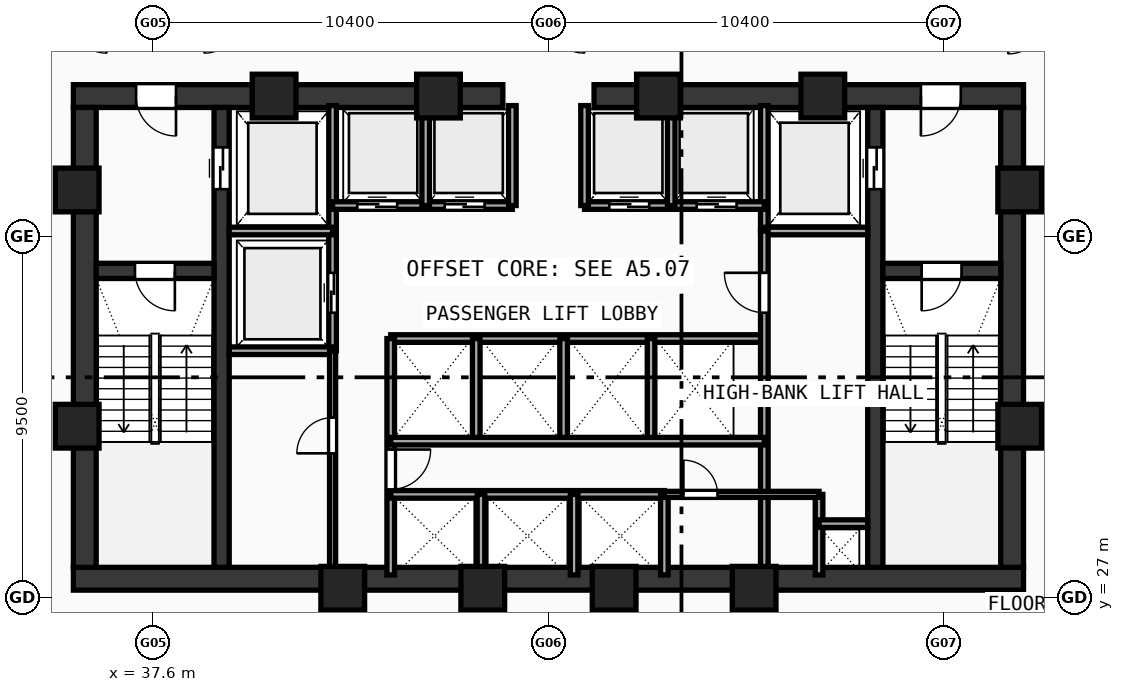
"""IFC4 building model, lengths in metres.
Left out: names, types, materials, properties, quantities, classifications, styles, units other than length and angle.
Written with IfcOpenShell. Run it as: python <this file> out.ifc"""

import sys

from ifc_helpers import new_model, si_unit, direction, frame, frame_2d, origin, origin_with_axes, origin_2d, place, context, subcontext, project, spatial, rectangle, hollow_rectangle, extrude, source, transform, mapped, element, fill, save


model = new_model("IFC4")
c1 = context("Model", 3, precision=1e-05, world=origin(), true_north=direction((0.0, 1.0)))
c2 = subcontext(c1, "Body", "Model", "MODEL_VIEW")
j1 = project(units=[si_unit("LENGTHUNIT", "METRE"), si_unit("PLANEANGLEUNIT", "RADIAN")], contexts=[c1])
p1 = place(None, origin())
s1 = spatial("IfcSite", under=j1, at=p1, CompositionType="ELEMENT")
p2 = place(p1, origin())
s2 = spatial("IfcBuilding", under=s1, at=p2, CompositionType="ELEMENT")
p3 = place(p2, frame((0.0, 0.0, 84.98)))
s3 = spatial("IfcBuildingStorey", under=s2, at=p3, CompositionType="ELEMENT", Elevation=84.98)
p4 = place(p3, frame((35.5, 27.5, 0.0), z_axis=(0.0, 0.0, 1.0), x_axis=(1.0, 0.0, 0.0)))
e1 = element("IfcWall", 1, at=p4, inside=s3, PredefinedType="SHEAR", context=c2, shape_type="SweptSolid", body=[
    extrude(rectangle(XDim=25.0, YDim=0.6, at=frame_2d((12.5, 0.0))), origin(), (0.0, 0.0, 1.0), 3.54),
])
p5 = place(p3, frame((35.5, 40.2, 0.0), z_axis=(0.0, 0.0, 1.0), x_axis=(1.0, 0.0, 0.0)))
e2 = element("IfcWall", 2, at=p5, inside=s3, PredefinedType="SHEAR", context=c2, shape_type="SweptSolid", body=[
    extrude(rectangle(XDim=11.3, YDim=0.6, at=frame_2d((5.65, 0.0))), origin(), (0.0, 0.0, 1.0), 3.54),
])
p6 = place(p5, frame((1.65, 0.0, 0.0)))
e3 = element("IfcOpeningElement", 3, at=p6, cuts=e2, PredefinedType="OPENING", context=c2, shape_type="SweptSolid", body=[
    extrude(rectangle(XDim=1.05, YDim=2.1, at=frame_2d((0.525, 1.05))), frame((0.0, 0.31, 0.0), z_axis=(0.0, -1.0, 0.0), x_axis=(1.0, 0.0, 0.0)), (0.0, 0.0, 1.0), 0.62),
])
p7 = place(p3, frame((49.2, 40.2, 0.0), z_axis=(0.0, 0.0, 1.0), x_axis=(1.0, 0.0, 0.0)))
e4 = element("IfcWall", 4, at=p7, inside=s3, PredefinedType="SHEAR", context=c2, shape_type="SweptSolid", body=[
    extrude(rectangle(XDim=11.3, YDim=0.6, at=frame_2d((5.65, 0.0))), origin(), (0.0, 0.0, 1.0), 3.54),
])
p8 = place(p7, frame((8.6, 0.0, 0.0)))
e5 = element("IfcOpeningElement", 5, at=p8, cuts=e4, PredefinedType="OPENING", context=c2, shape_type="SweptSolid", body=[
    extrude(rectangle(XDim=1.05, YDim=2.1, at=frame_2d((0.525, 1.05))), frame((0.0, 0.31, 0.0), z_axis=(0.0, -1.0, 0.0), x_axis=(1.0, 0.0, 0.0)), (0.0, 0.0, 1.0), 0.62),
])
for number, where, z_axis, x_axis in (
    (6, (35.8, 27.8, 0.0), (0.0, 0.0, 1.0), (0.0, 1.0, 0.0)),
    (7, (60.2, 27.8, 0.0), (0.0, 0.0, 1.0), (0.0, 1.0, 0.0)),
):
    element("IfcWall", number, at=place(p3, frame(where, z_axis=z_axis, x_axis=x_axis)), inside=s3, PredefinedType="SHEAR", context=c2, shape_type="SweptSolid", body=[
        extrude(rectangle(XDim=12.1, YDim=0.6, at=frame_2d((6.05, 0.0))), origin(), (0.0, 0.0, 1.0), 3.54),
    ])
p9 = place(p3, frame((39.4, 27.8, 0.0), z_axis=(0.0, 0.0, 1.0), x_axis=(0.0, 1.0, 0.0)))
e8 = element("IfcWall", 8, at=p9, inside=s3, PredefinedType="SHEAR", context=c2, shape_type="SweptSolid", body=[
    extrude(rectangle(XDim=12.1, YDim=0.4, at=frame_2d((6.05, 0.0))), origin(), (0.0, 0.0, 1.0), 3.54),
])
p10 = place(p9, frame((9.95, 0.0, 0.0)))
e9 = element("IfcOpeningElement", 9, at=p10, cuts=e8, PredefinedType="OPENING", context=c2, shape_type="SweptSolid", body=[
    extrude(rectangle(XDim=1.1, YDim=2.1, at=frame_2d((0.55, 1.05))), frame((0.0, 0.21, 0.0), z_axis=(0.0, -1.0, 0.0), x_axis=(1.0, 0.0, 0.0)), (0.0, 0.0, 1.0), 0.42),
])
p11 = place(p3, frame((56.6, 27.8, 0.0), z_axis=(0.0, 0.0, 1.0), x_axis=(0.0, 1.0, 0.0)))
e10 = element("IfcWall", 10, at=p11, inside=s3, PredefinedType="SHEAR", context=c2, shape_type="SweptSolid", body=[
    extrude(rectangle(XDim=12.1, YDim=0.4, at=frame_2d((6.05, 0.0))), origin(), (0.0, 0.0, 1.0), 3.54),
])
p12 = place(p11, frame((9.95, 0.0, 0.0)))
e11 = element("IfcOpeningElement", 11, at=p12, cuts=e10, PredefinedType="OPENING", context=c2, shape_type="SweptSolid", body=[
    extrude(rectangle(XDim=1.1, YDim=2.1, at=frame_2d((0.55, 1.05))), frame((0.0, 0.21, 0.0), z_axis=(0.0, -1.0, 0.0), x_axis=(1.0, 0.0, 0.0)), (0.0, 0.0, 1.0), 0.42),
])
p13 = place(p3, frame((36.1, 35.6, 0.0), z_axis=(0.0, 0.0, 1.0), x_axis=(1.0, 0.0, 0.0)))
e12 = element("IfcWall", 12, at=p13, inside=s3, PredefinedType="SHEAR", context=c2, shape_type="SweptSolid", body=[
    extrude(rectangle(XDim=3.1, YDim=0.4, at=frame_2d((1.55, 0.0))), origin(), (0.0, 0.0, 1.0), 3.54),
])
p14 = place(p13, frame((1.02, 0.0, 0.0)))
e13 = element("IfcOpeningElement", 13, at=p14, cuts=e12, PredefinedType="OPENING", context=c2, shape_type="SweptSolid", body=[
    extrude(rectangle(XDim=1.05, YDim=2.1, at=frame_2d((0.525, 1.05))), frame((0.0, 0.21, 0.0), z_axis=(0.0, -1.0, 0.0), x_axis=(1.0, 0.0, 0.0)), (0.0, 0.0, 1.0), 0.42),
])
p15 = place(p3, frame((56.8, 35.6, 0.0), z_axis=(0.0, 0.0, 1.0), x_axis=(1.0, 0.0, 0.0)))
e14 = element("IfcWall", 14, at=p15, inside=s3, PredefinedType="SHEAR", context=c2, shape_type="SweptSolid", body=[
    extrude(rectangle(XDim=3.1, YDim=0.4, at=frame_2d((1.55, 0.0))), origin(), (0.0, 0.0, 1.0), 3.54),
])
p16 = place(p15, frame((1.02, 0.0, 0.0)))
e15 = element("IfcOpeningElement", 15, at=p16, cuts=e14, PredefinedType="OPENING", context=c2, shape_type="SweptSolid", body=[
    extrude(rectangle(XDim=1.05, YDim=2.1, at=frame_2d((0.525, 1.05))), frame((0.0, 0.21, 0.0), z_axis=(0.0, -1.0, 0.0), x_axis=(1.0, 0.0, 0.0)), (0.0, 0.0, 1.0), 0.42),
])
m1 = source(origin(), c2, "Body", "SweptSolid", [
    extrude(hollow_rectangle(XDim=1.15, YDim=1.15, WallThickness=0.048, at=origin_2d()), origin(), (0.0, 0.0, 1.0), 3.8),
])
for number, where, z_axis, x_axis in (
    (16, (42.588, 27.25, -0.26), (0.0, 0.0, 1.0), (1.0, 0.0, 0.0)),
    (17, (46.272, 27.25, -0.26), (0.0, 0.0, 1.0), (1.0, 0.0, 0.0)),
    (18, (49.729, 27.25, -0.26), (0.0, 0.0, 1.0), (1.0, 0.0, 0.0)),
    (19, (53.412, 27.25, -0.26), (0.0, 0.0, 1.0), (1.0, 0.0, 0.0)),
    (20, (60.4, 31.513, -0.26), (0.0, 0.0, 1.0), (1.0, 0.0, 0.0)),
    (21, (60.4, 37.729, -0.26), (0.0, 0.0, 1.0), (1.0, 0.0, 0.0)),
    (22, (55.219, 40.2, -0.26), (0.0, 0.0, 1.0), (1.0, 0.0, 0.0)),
    (23, (50.894, 40.2, -0.26), (0.0, 0.0, 1.0), (1.0, 0.0, 0.0)),
    (24, (45.106, 40.2, -0.26), (0.0, 0.0, 1.0), (1.0, 0.0, 0.0)),
    (25, (40.781, 40.2, -0.26), (0.0, 0.0, 1.0), (1.0, 0.0, 0.0)),
    (26, (35.6, 37.729, -0.26), (0.0, 0.0, 1.0), (1.0, 0.0, 0.0)),
    (27, (35.6, 31.513, -0.26), (0.0, 0.0, 1.0), (1.0, 0.0, 0.0)),
):
    element("IfcColumn", number, at=place(p3, frame(where, z_axis=z_axis, x_axis=x_axis)), inside=s3, PredefinedType="COLUMN", context=c2, shape_type="MappedRepresentation", body=[
        mapped(m1, transform((0.0, 0.0, 0.0), scale=1.0)),
    ])
p17 = place(p3, frame((42.32, 33.5, 0.0), z_axis=(0.0, 0.0, 1.0), x_axis=(0.0, 1.0, 0.0)))
e28 = element("IfcWall", 28, at=p17, inside=s3, PredefinedType="SOLIDWALL", context=c2, shape_type="SweptSolid", body=[
    extrude(rectangle(XDim=6.45, YDim=0.2, at=frame_2d((3.225, 0.0))), origin(), (0.0, 0.0, 1.0), 3.54),
])
p18 = place(p17, frame((1.0, 0.0, 0.0)))
e29 = element("IfcOpeningElement", 29, at=p18, cuts=e28, PredefinedType="OPENING", context=c2, shape_type="SweptSolid", body=[
    extrude(rectangle(XDim=1.05, YDim=2.1, at=frame_2d((0.525, 1.05))), frame((0.0, 0.11, 0.0), z_axis=(0.0, -1.0, 0.0), x_axis=(1.0, 0.0, 0.0)), (0.0, 0.0, 1.0), 0.22),
])
for number, where, z_axis, x_axis in (
    (30, (39.6, 36.65, 0.0), (0.0, 0.0, 1.0), (1.0, 0.0, 0.0)),
    (31, (39.6, 33.5, 0.0), (0.0, 0.0, 1.0), (1.0, 0.0, 0.0)),
):
    element("IfcWall", number, at=place(p3, frame(where, z_axis=z_axis, x_axis=x_axis)), inside=s3, PredefinedType="SOLIDWALL", context=c2, shape_type="SweptSolid", body=[
        extrude(rectangle(XDim=2.72, YDim=0.2, at=frame_2d((1.36, 0.0))), origin(), (0.0, 0.0, 1.0), 3.54),
    ])
p19 = place(p3, frame((53.68, 36.65, 0.0), z_axis=(0.0, 0.0, 1.0), x_axis=(0.0, 1.0, 0.0)))
e32 = element("IfcWall", 32, at=p19, inside=s3, PredefinedType="SOLIDWALL", context=c2, shape_type="SweptSolid", body=[
    extrude(rectangle(XDim=3.3, YDim=0.2, at=frame_2d((1.65, 0.0))), origin(), (0.0, 0.0, 1.0), 3.54),
])
p20 = place(p3, frame((53.68, 36.65, 0.0), z_axis=(0.0, 0.0, 1.0), x_axis=(1.0, 0.0, 0.0)))
e33 = element("IfcWall", 33, at=p20, inside=s3, PredefinedType="SOLIDWALL", context=c2, shape_type="SweptSolid", body=[
    extrude(rectangle(XDim=2.72, YDim=0.2, at=frame_2d((1.36, 0.0))), origin(), (0.0, 0.0, 1.0), 3.54),
])
p21 = place(p3, frame((42.32, 37.32, 0.0), z_axis=(0.0, 0.0, 1.0), x_axis=(1.0, 0.0, 0.0)))
e34 = element("IfcWall", 34, at=p21, inside=s3, PredefinedType="SOLIDWALL", context=c2, shape_type="SweptSolid", body=[
    extrude(rectangle(XDim=4.73, YDim=0.2, at=frame_2d((2.365, 0.0))), origin(), (0.0, 0.0, 1.0), 3.54),
])
p22 = place(p21, frame((0.65, 0.0, 0.0)))
e35 = element("IfcOpeningElement", 35, at=p22, cuts=e34, PredefinedType="OPENING", context=c2, shape_type="SweptSolid", body=[
    extrude(rectangle(XDim=1.05, YDim=2.1, at=frame_2d((0.525, 1.05))), frame((0.0, 0.11, 0.0), z_axis=(0.0, -1.0, 0.0), x_axis=(1.0, 0.0, 0.0)), (0.0, 0.0, 1.0), 0.22),
])
p23 = place(p21, frame((2.95, 0.0, 0.0)))
e36 = element("IfcOpeningElement", 36, at=p23, cuts=e34, PredefinedType="OPENING", context=c2, shape_type="SweptSolid", body=[
    extrude(rectangle(XDim=1.05, YDim=2.1, at=frame_2d((0.525, 1.05))), frame((0.0, 0.11, 0.0), z_axis=(0.0, -1.0, 0.0), x_axis=(1.0, 0.0, 0.0)), (0.0, 0.0, 1.0), 0.22),
])
p24 = place(p3, frame((48.95, 37.32, 0.0), z_axis=(0.0, 0.0, 1.0), x_axis=(1.0, 0.0, 0.0)))
e37 = element("IfcWall", 37, at=p24, inside=s3, PredefinedType="SOLIDWALL", context=c2, shape_type="SweptSolid", body=[
    extrude(rectangle(XDim=4.73, YDim=0.2, at=frame_2d((2.365, 0.0))), origin(), (0.0, 0.0, 1.0), 3.54),
])
p25 = place(p24, frame((0.65, 0.0, 0.0)))
e38 = element("IfcOpeningElement", 38, at=p25, cuts=e37, PredefinedType="OPENING", context=c2, shape_type="SweptSolid", body=[
    extrude(rectangle(XDim=1.05, YDim=2.1, at=frame_2d((0.525, 1.05))), frame((0.0, 0.11, 0.0), z_axis=(0.0, -1.0, 0.0), x_axis=(1.0, 0.0, 0.0)), (0.0, 0.0, 1.0), 0.22),
])
p26 = place(p24, frame((2.95, 0.0, 0.0)))
e39 = element("IfcOpeningElement", 39, at=p26, cuts=e37, PredefinedType="OPENING", context=c2, shape_type="SweptSolid", body=[
    extrude(rectangle(XDim=1.05, YDim=2.1, at=frame_2d((0.525, 1.05))), frame((0.0, 0.11, 0.0), z_axis=(0.0, -1.0, 0.0), x_axis=(1.0, 0.0, 0.0)), (0.0, 0.0, 1.0), 0.22),
])
for number, where, z_axis, x_axis in (
    (40, (47.05, 37.32, 0.0), (0.0, 0.0, 1.0), (0.0, 1.0, 0.0)),
    (41, (48.95, 37.32, 0.0), (0.0, 0.0, 1.0), (0.0, 1.0, 0.0)),
    (42, (44.77, 37.32, 0.0), (0.0, 0.0, 1.0), (0.0, 1.0, 0.0)),
    (43, (51.23, 37.32, 0.0), (0.0, 0.0, 1.0), (0.0, 1.0, 0.0)),
):
    element("IfcWall", number, at=place(p3, frame(where, z_axis=z_axis, x_axis=x_axis)), inside=s3, PredefinedType="SOLIDWALL", context=c2, shape_type="SweptSolid", body=[
        extrude(rectangle(XDim=2.63, YDim=0.2, at=frame_2d((1.315, 0.0))), origin(), (0.0, 0.0, 1.0), 3.54),
    ])
p27 = place(p3, frame((43.85, 33.82, 0.0), z_axis=(0.0, 0.0, 1.0), x_axis=(1.0, 0.0, 0.0)))
e44 = element("IfcWall", 44, at=p27, inside=s3, PredefinedType="SOLIDWALL", context=c2, shape_type="SweptSolid", body=[
    extrude(rectangle(XDim=9.83, YDim=0.2, at=frame_2d((4.915, 0.0))), origin(), (0.0, 0.0, 1.0), 3.54),
])
p28 = place(p3, frame((43.85, 27.6, 0.0), z_axis=(0.0, 0.0, 1.0), x_axis=(0.0, 1.0, 0.0)))
e45 = element("IfcWall", 45, at=p28, inside=s3, PredefinedType="SOLIDWALL", context=c2, shape_type="SweptSolid", body=[
    extrude(rectangle(XDim=6.22, YDim=0.2, at=frame_2d((3.11, 0.0))), origin(), (0.0, 0.0, 1.0), 3.54),
])
p29 = place(p28, frame((2.25, 0.0, 0.0)))
e46 = element("IfcOpeningElement", 46, at=p29, cuts=e45, PredefinedType="OPENING", context=c2, shape_type="SweptSolid", body=[
    extrude(rectangle(XDim=1.05, YDim=2.1, at=frame_2d((0.525, 1.05))), frame((0.0, 0.11, 0.0), z_axis=(0.0, -1.0, 0.0), x_axis=(1.0, 0.0, 0.0)), (0.0, 0.0, 1.0), 0.22),
])
p30 = place(p3, frame((53.68, 27.6, 0.0), z_axis=(0.0, 0.0, 1.0), x_axis=(0.0, 1.0, 0.0)))
e47 = element("IfcWall", 47, at=p30, inside=s3, PredefinedType="SOLIDWALL", context=c2, shape_type="SweptSolid", body=[
    extrude(rectangle(XDim=9.05, YDim=0.2, at=frame_2d((4.525, 0.0))), origin(), (0.0, 0.0, 1.0), 3.54),
])
p31 = place(p30, frame((6.9, 0.0, 0.0)))
e48 = element("IfcOpeningElement", 48, at=p31, cuts=e47, PredefinedType="OPENING", context=c2, shape_type="SweptSolid", body=[
    extrude(rectangle(XDim=1.05, YDim=2.1, at=frame_2d((0.525, 1.05))), frame((0.0, 0.11, 0.0), z_axis=(0.0, -1.0, 0.0), x_axis=(1.0, 0.0, 0.0)), (0.0, 0.0, 1.0), 0.22),
])
for number, where, z_axis, x_axis in (
    (49, (46.1, 31.12, 0.0), (0.0, 0.0, 1.0), (0.0, 1.0, 0.0)),
    (50, (48.4, 31.12, 0.0), (0.0, 0.0, 1.0), (0.0, 1.0, 0.0)),
    (51, (50.7, 31.12, 0.0), (0.0, 0.0, 1.0), (0.0, 1.0, 0.0)),
):
    element("IfcWall", number, at=place(p3, frame(where, z_axis=z_axis, x_axis=x_axis)), inside=s3, PredefinedType="SOLIDWALL", context=c2, shape_type="SweptSolid", body=[
        extrude(rectangle(XDim=2.7, YDim=0.2, at=frame_2d((1.35, 0.0))), origin(), (0.0, 0.0, 1.0), 3.54),
    ])
p32 = place(p3, frame((43.85, 29.72, 0.0), z_axis=(0.0, 0.0, 1.0), x_axis=(1.0, 0.0, 0.0)))
e52 = element("IfcWall", 52, at=p32, inside=s3, PredefinedType="SOLIDWALL", context=c2, shape_type="SweptSolid", body=[
    extrude(rectangle(XDim=7.2, YDim=0.2, at=frame_2d((3.6, 0.0))), origin(), (0.0, 0.0, 1.0), 3.54),
])
p33 = place(p3, frame((51.05, 27.6, 0.0), z_axis=(0.0, 0.0, 1.0), x_axis=(0.0, 1.0, 0.0)))
e53 = element("IfcWall", 53, at=p33, inside=s3, PredefinedType="SOLIDWALL", context=c2, shape_type="SweptSolid", body=[
    extrude(rectangle(XDim=2.12, YDim=0.2, at=frame_2d((1.06, 0.0))), origin(), (0.0, 0.0, 1.0), 3.54),
])
p34 = place(p3, frame((43.85, 31.12, 0.0), z_axis=(0.0, 0.0, 1.0), x_axis=(1.0, 0.0, 0.0)))
e54 = element("IfcWall", 54, at=p34, inside=s3, PredefinedType="SOLIDWALL", context=c2, shape_type="SweptSolid", body=[
    extrude(rectangle(XDim=9.83, YDim=0.2, at=frame_2d((4.915, 0.0))), origin(), (0.0, 0.0, 1.0), 3.54),
])
for number, where, z_axis, x_axis in (
    (55, (46.225, 27.6, 0.0), (0.0, 0.0, 1.0), (0.0, 1.0, 0.0)),
    (56, (48.675, 27.6, 0.0), (0.0, 0.0, 1.0), (0.0, 1.0, 0.0)),
    (57, (55.12, 27.6, 0.0), (0.0, 0.0, 1.0), (0.0, 1.0, 0.0)),
):
    element("IfcWall", number, at=place(p3, frame(where, z_axis=z_axis, x_axis=x_axis)), inside=s3, PredefinedType="SOLIDWALL", context=c2, shape_type="SweptSolid", body=[
        extrude(rectangle(XDim=2.12, YDim=0.2, at=frame_2d((1.06, 0.0))), origin(), (0.0, 0.0, 1.0), 3.54),
    ])
p35 = place(p3, frame((55.12, 28.95, 0.0), z_axis=(0.0, 0.0, 1.0), x_axis=(1.0, 0.0, 0.0)))
e58 = element("IfcWall", 58, at=p35, inside=s3, PredefinedType="SOLIDWALL", context=c2, shape_type="SweptSolid", body=[
    extrude(rectangle(XDim=1.28, YDim=0.2, at=frame_2d((0.64, 0.0))), origin(), (0.0, 0.0, 1.0), 3.54),
])
p36 = place(p3, frame((42.32, 27.6, 0.0), z_axis=(0.0, 0.0, 1.0), x_axis=(0.0, 1.0, 0.0)))
e59 = element("IfcWall", 59, at=p36, inside=s3, PredefinedType="PARTITIONING", context=c2, shape_type="SweptSolid", body=[
    extrude(rectangle(XDim=5.9, YDim=0.16, at=frame_2d((2.95, 0.0))), origin(), (0.0, 0.0, 1.0), 3.54),
])
p37 = place(p36, frame((3.2, 0.0, 0.0)))
e60 = element("IfcOpeningElement", 60, at=p37, cuts=e59, PredefinedType="OPENING", context=c2, shape_type="SweptSolid", body=[
    extrude(rectangle(XDim=0.94, YDim=2.1, at=frame_2d((0.47, 1.05))), frame((0.0, 0.09, 0.0), z_axis=(0.0, -1.0, 0.0), x_axis=(1.0, 0.0, 0.0)), (0.0, 0.0, 1.0), 0.18),
])
p38 = place(p3, frame((51.05, 29.72, 0.0), z_axis=(0.0, 0.0, 1.0), x_axis=(1.0, 0.0, 0.0)))
e61 = element("IfcWall", 61, at=p38, inside=s3, PredefinedType="PARTITIONING", context=c2, shape_type="SweptSolid", body=[
    extrude(rectangle(XDim=4.07, YDim=0.16, at=frame_2d((2.035, 0.0))), origin(), (0.0, 0.0, 1.0), 3.54),
])
p39 = place(p38, frame((0.5, 0.0, 0.0)))
e62 = element("IfcOpeningElement", 62, at=p39, cuts=e61, PredefinedType="OPENING", context=c2, shape_type="SweptSolid", body=[
    extrude(rectangle(XDim=0.9, YDim=2.1, at=frame_2d((0.45, 1.05))), frame((0.0, 0.09, 0.0), z_axis=(0.0, -1.0, 0.0), x_axis=(1.0, 0.0, 0.0)), (0.0, 0.0, 1.0), 0.18),
])
m2 = source(origin(), c2, "Body", "SweptSolid", [
    extrude(rectangle(XDim=1.05, YDim=2.1, at=frame_2d((0.525, 1.05))), frame((0.0, 0.025, 0.0), z_axis=(0.0, -1.0, 0.0), x_axis=(1.0, 0.0, 0.0)), (0.0, 0.0, 1.0), 0.05),
])
p40 = place(p14, frame((1.05, 0.0, 0.0), z_axis=(0.0, 0.0, 1.0), x_axis=(-1.0, 0.0, 0.0)))
e63 = element("IfcDoor", 63, at=p40, inside=s3, OperationType="SINGLE_SWING_LEFT", PredefinedType="DOOR", context=c2, shape_type="MappedRepresentation", body=[
    mapped(m2, transform((0.0, 0.0, 0.0), scale=1.0)),
])
fill(e13, e63)
p41 = place(p16, frame((1.05, 0.0, 0.0), z_axis=(0.0, 0.0, 1.0), x_axis=(-1.0, 0.0, 0.0)))
e64 = element("IfcDoor", 64, at=p41, inside=s3, OperationType="SINGLE_SWING_RIGHT", PredefinedType="DOOR", context=c2, shape_type="MappedRepresentation", body=[
    mapped(m2, transform((0.0, 0.0, 0.0), scale=1.0)),
])
fill(e15, e64)
p42 = place(p6, frame((1.05, 0.0, 0.0), z_axis=(0.0, 0.0, 1.0), x_axis=(-1.0, 0.0, 0.0)))
e65 = element("IfcDoor", 65, at=p42, inside=s3, OperationType="SINGLE_SWING_LEFT", PredefinedType="DOOR", context=c2, shape_type="MappedRepresentation", body=[
    mapped(m2, transform((0.0, 0.0, 0.0), scale=1.0)),
])
fill(e3, e65)
p43 = place(p8, frame((1.05, 0.0, 0.0), z_axis=(0.0, 0.0, 1.0), x_axis=(-1.0, 0.0, 0.0)))
e66 = element("IfcDoor", 66, at=p43, inside=s3, OperationType="SINGLE_SWING_RIGHT", PredefinedType="DOOR", context=c2, shape_type="MappedRepresentation", body=[
    mapped(m2, transform((0.0, 0.0, 0.0), scale=1.0)),
])
fill(e5, e66)
m3 = source(origin(), c2, "Body", "SweptSolid", [
    extrude(rectangle(XDim=1.1, YDim=2.1, at=frame_2d((0.55, 1.05))), frame((0.0, 0.025, 0.0), z_axis=(0.0, -1.0, 0.0), x_axis=(1.0, 0.0, 0.0)), (0.0, 0.0, 1.0), 0.05),
])
p44 = place(p10, frame((1.1, 0.0, 0.0), z_axis=(0.0, 0.0, 1.0), x_axis=(-1.0, 0.0, 0.0)))
e67 = element("IfcDoor", 67, at=p44, inside=s3, OperationType="DOUBLE_DOOR_SLIDING", PredefinedType="DOOR", context=c2, shape_type="MappedRepresentation", body=[
    mapped(m3, transform((0.0, 0.0, 0.0), scale=1.0)),
])
fill(e9, e67)
p45 = place(p12, origin_with_axes())
e68 = element("IfcDoor", 68, at=p45, inside=s3, OperationType="DOUBLE_DOOR_SLIDING", PredefinedType="DOOR", context=c2, shape_type="MappedRepresentation", body=[
    mapped(m3, transform((0.0, 0.0, 0.0), scale=1.0)),
])
fill(e11, e68)
p46 = place(p18, origin_with_axes())
e69 = element("IfcDoor", 69, at=p46, inside=s3, OperationType="DOUBLE_DOOR_SLIDING", PredefinedType="DOOR", context=c2, shape_type="MappedRepresentation", body=[
    mapped(m2, transform((0.0, 0.0, 0.0), scale=1.0)),
])
fill(e29, e69)
p47 = place(p22, frame((1.05, 0.0, 0.0), z_axis=(0.0, 0.0, 1.0), x_axis=(-1.0, 0.0, 0.0)))
e70 = element("IfcDoor", 70, at=p47, inside=s3, OperationType="DOUBLE_DOOR_SLIDING", PredefinedType="DOOR", context=c2, shape_type="MappedRepresentation", body=[
    mapped(m2, transform((0.0, 0.0, 0.0), scale=1.0)),
])
fill(e35, e70)
p48 = place(p23, frame((1.05, 0.0, 0.0), z_axis=(0.0, 0.0, 1.0), x_axis=(-1.0, 0.0, 0.0)))
e71 = element("IfcDoor", 71, at=p48, inside=s3, OperationType="DOUBLE_DOOR_SLIDING", PredefinedType="DOOR", context=c2, shape_type="MappedRepresentation", body=[
    mapped(m2, transform((0.0, 0.0, 0.0), scale=1.0)),
])
fill(e36, e71)
p49 = place(p25, frame((1.05, 0.0, 0.0), z_axis=(0.0, 0.0, 1.0), x_axis=(-1.0, 0.0, 0.0)))
e72 = element("IfcDoor", 72, at=p49, inside=s3, OperationType="DOUBLE_DOOR_SLIDING", PredefinedType="DOOR", context=c2, shape_type="MappedRepresentation", body=[
    mapped(m2, transform((0.0, 0.0, 0.0), scale=1.0)),
])
fill(e38, e72)
p50 = place(p26, frame((1.05, 0.0, 0.0), z_axis=(0.0, 0.0, 1.0), x_axis=(-1.0, 0.0, 0.0)))
e73 = element("IfcDoor", 73, at=p50, inside=s3, OperationType="DOUBLE_DOOR_SLIDING", PredefinedType="DOOR", context=c2, shape_type="MappedRepresentation", body=[
    mapped(m2, transform((0.0, 0.0, 0.0), scale=1.0)),
])
fill(e39, e73)
p51 = place(p29, frame((1.05, 0.0, 0.0), z_axis=(0.0, 0.0, 1.0), x_axis=(-1.0, 0.0, 0.0)))
e74 = element("IfcDoor", 74, at=p51, inside=s3, OperationType="SINGLE_SWING_LEFT", PredefinedType="DOOR", context=c2, shape_type="MappedRepresentation", body=[
    mapped(m2, transform((0.0, 0.0, 0.0), scale=1.0)),
])
fill(e46, e74)
p52 = place(p31, origin_with_axes())
e75 = element("IfcDoor", 75, at=p52, inside=s3, OperationType="SINGLE_SWING_RIGHT", PredefinedType="DOOR", context=c2, shape_type="MappedRepresentation", body=[
    mapped(m2, transform((0.0, 0.0, 0.0), scale=1.0)),
])
fill(e48, e75)
m4 = source(origin(), c2, "Body", "SweptSolid", [
    extrude(rectangle(XDim=0.94, YDim=2.1, at=frame_2d((0.47, 1.05))), frame((0.0, 0.025, 0.0), z_axis=(0.0, -1.0, 0.0), x_axis=(1.0, 0.0, 0.0)), (0.0, 0.0, 1.0), 0.05),
])
p53 = place(p37, origin_with_axes())
e76 = element("IfcDoor", 76, at=p53, inside=s3, OperationType="SINGLE_SWING_LEFT", PredefinedType="DOOR", context=c2, shape_type="MappedRepresentation", body=[
    mapped(m4, transform((0.0, 0.0, 0.0), scale=1.0)),
])
fill(e60, e76)
m5 = source(origin(), c2, "Body", "SweptSolid", [
    extrude(rectangle(XDim=0.9, YDim=2.1, at=frame_2d((0.45, 1.05))), frame((0.0, 0.025, 0.0), z_axis=(0.0, -1.0, 0.0), x_axis=(1.0, 0.0, 0.0)), (0.0, 0.0, 1.0), 0.05),
])
p54 = place(p39, origin_with_axes())
e77 = element("IfcDoor", 77, at=p54, inside=s3, OperationType="SINGLE_SWING_LEFT", PredefinedType="DOOR", context=c2, shape_type="MappedRepresentation", body=[
    mapped(m5, transform((0.0, 0.0, 0.0), scale=1.0)),
])
fill(e62, e77)
save(model, sys.argv[1])
